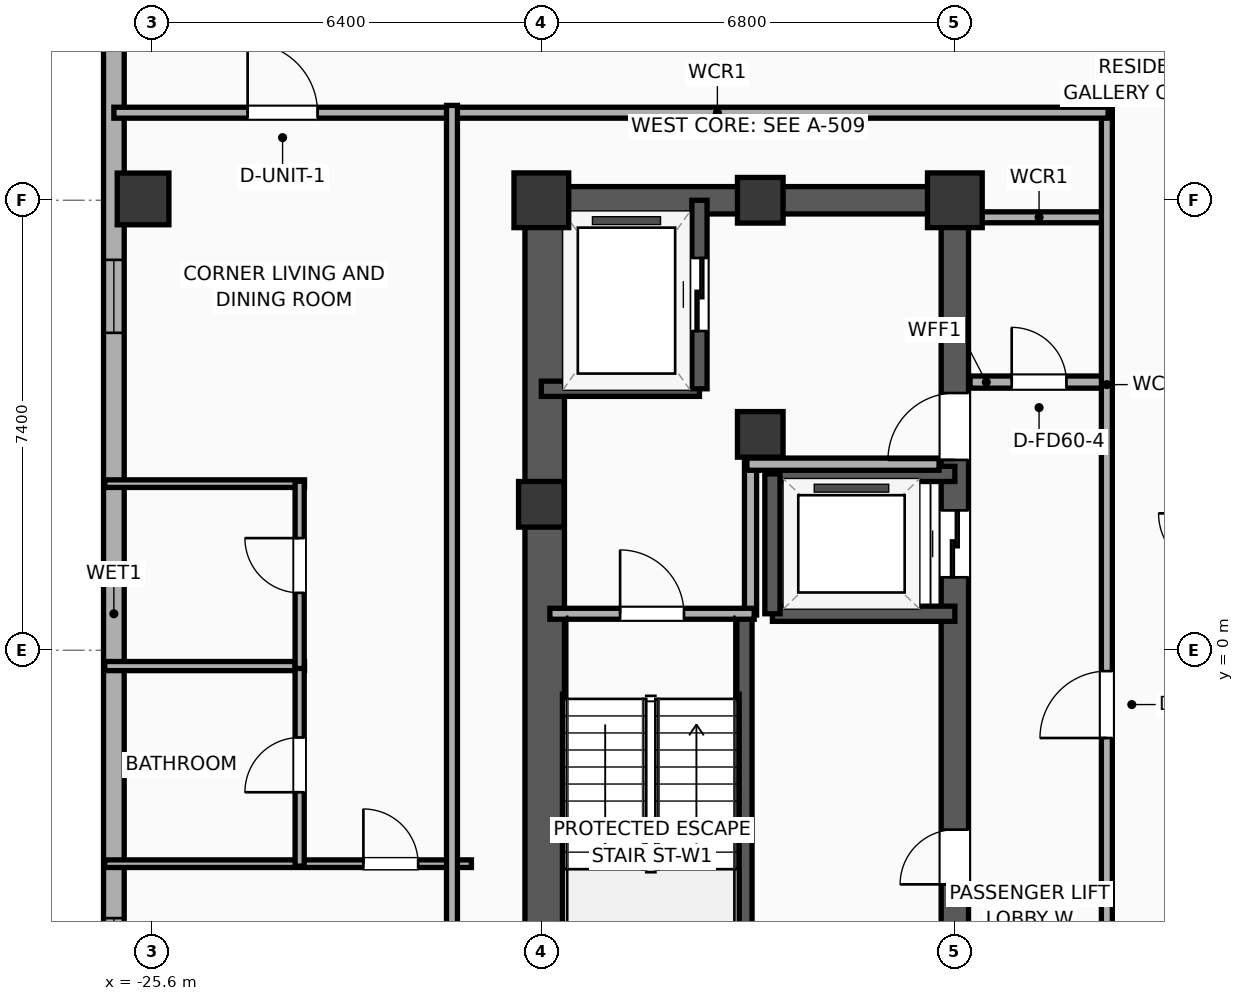
"""IFC4 building model, lengths in metres.
Left out: names, types, materials, properties, quantities, classifications, styles, units other than length and angle.
Written with IfcOpenShell. Run it as: python <this file> out.ifc"""

import sys

from ifc_helpers import new_model, si_unit, direction, frame, frame_2d, origin, origin_2d, place, context, subcontext, project, spatial, rectangle, hollow_rectangle, extrude, element, fill, save


model = new_model("IFC4")
c1 = context("Model", 3, precision=1e-05, world=origin(), true_north=direction((0.0, 1.0)))
c2 = subcontext(c1, "Body", "Model", "MODEL_VIEW")
j1 = project(units=[si_unit("LENGTHUNIT", "METRE"), si_unit("PLANEANGLEUNIT", "RADIAN")], contexts=[c1])
p1 = place(None, origin())
s1 = spatial("IfcSite", under=j1, at=p1, CompositionType="ELEMENT")
p2 = place(p1, origin())
s2 = spatial("IfcBuilding", under=s1, at=p2, CompositionType="ELEMENT")
p3 = place(p2, frame((0.0, 0.0, 227.5)))
s3 = spatial("IfcBuildingStorey", under=s2, at=p3, CompositionType="ELEMENT", Elevation=227.5)
p4 = place(p3, frame((-19.2, 2.4, 0.0), z_axis=(0.0, 0.0, 1.0), x_axis=(1.0, 0.0, 0.0)))
e1 = element("IfcColumn", 1, at=p4, inside=s3, PredefinedType="COLUMN", context=c2, shape_type="SweptSolid", body=[
    extrude(rectangle(XDim=0.75, YDim=0.75, at=origin_2d()), origin(), (0.0, 0.0, 1.0), 3.9),
])
p5 = place(p3, frame((-19.2, 7.4, 0.0), z_axis=(0.0, 0.0, 1.0), x_axis=(1.0, 0.0, 0.0)))
e2 = element("IfcColumn", 2, at=p5, inside=s3, PredefinedType="COLUMN", context=c2, shape_type="SweptSolid", body=[
    extrude(rectangle(XDim=0.9, YDim=0.9, at=origin_2d()), origin(), (0.0, 0.0, 1.0), 3.9),
])
for number, where, z_axis, x_axis in (
    (3, (-15.6, 7.4, 0.0), (0.0, 0.0, 1.0), (1.0, 0.0, 0.0)),
    (4, (-15.6, 3.55, 0.0), (0.0, 0.0, 1.0), (1.0, 0.0, 0.0)),
):
    element("IfcColumn", number, at=place(p3, frame(where, z_axis=z_axis, x_axis=x_axis)), inside=s3, PredefinedType="COLUMN", context=c2, shape_type="SweptSolid", body=[
        extrude(rectangle(XDim=0.75, YDim=0.75, at=origin_2d()), origin(), (0.0, 0.0, 1.0), 3.9),
    ])
p6 = place(p3, frame((-12.4, 7.4, 0.0), z_axis=(0.0, 0.0, 1.0), x_axis=(1.0, 0.0, 0.0)))
e5 = element("IfcColumn", 5, at=p6, inside=s3, PredefinedType="COLUMN", context=c2, shape_type="SweptSolid", body=[
    extrude(rectangle(XDim=0.9, YDim=0.9, at=origin_2d()), origin(), (0.0, 0.0, 1.0), 3.9),
])
p7 = place(p3, frame((-19.425, 7.4, 0.0), z_axis=(0.0, 0.0, 1.0), x_axis=(1.0, 0.0, 0.0)))
e6 = element("IfcWall", 6, at=p7, inside=s3, PredefinedType="SHEAR", context=c2, shape_type="SweptSolid", body=[
    extrude(rectangle(XDim=7.25, YDim=0.45, at=frame_2d((3.625, 0.0))), origin(), (0.0, 0.0, 1.0), 3.65),
])
p8 = place(p3, frame((-19.145, -7.4, 0.0), z_axis=(0.0, 0.0, 1.0), x_axis=(0.0, 1.0, 0.0)))
e7 = element("IfcWall", 7, at=p8, inside=s3, PredefinedType="SHEAR", context=c2, shape_type="SweptSolid", body=[
    extrude(rectangle(XDim=14.8, YDim=0.65, at=frame_2d((7.4, 0.0))), origin(), (0.0, 0.0, 1.0), 3.65),
])
p9 = place(p3, frame((-12.4, -7.4, 0.0), z_axis=(0.0, 0.0, 1.0), x_axis=(0.0, 1.0, 0.0)))
e8 = element("IfcWall", 8, at=p9, inside=s3, PredefinedType="SHEAR", context=c2, shape_type="SweptSolid", body=[
    extrude(rectangle(XDim=14.8, YDim=0.45, at=frame_2d((7.4, 0.0))), origin(), (0.0, 0.0, 1.0), 3.65),
])
p10 = place(p9, frame((8.6, 0.0, 0.0)))
e9 = element("IfcOpeningElement", 9, at=p10, cuts=e8, PredefinedType="OPENING", context=c2, shape_type="SweptSolid", body=[
    extrude(rectangle(XDim=1.1, YDim=2.05, at=frame_2d((0.55, 1.025))), frame((0.0, 0.235, 0.0), z_axis=(0.0, -1.0, 0.0), x_axis=(1.0, 0.0, 0.0)), (0.0, 0.0, 1.0), 0.47),
])
p11 = place(p9, frame((10.53, 0.0, 0.0)))
e10 = element("IfcOpeningElement", 10, at=p11, cuts=e8, PredefinedType="OPENING", context=c2, shape_type="SweptSolid", body=[
    extrude(rectangle(XDim=1.1, YDim=2.05, at=frame_2d((0.55, 1.025))), frame((0.0, 0.235, 0.0), z_axis=(0.0, -1.0, 0.0), x_axis=(1.0, 0.0, 0.0)), (0.0, 0.0, 1.0), 0.47),
])
p12 = place(p9, frame((3.55, 0.0, 0.0)))
e11 = element("IfcOpeningElement", 11, at=p12, cuts=e8, PredefinedType="OPENING", context=c2, shape_type="SweptSolid", body=[
    extrude(rectangle(XDim=0.9, YDim=2.05, at=frame_2d((0.45, 1.025))), frame((0.0, 0.235, 0.0), z_axis=(0.0, -1.0, 0.0), x_axis=(1.0, 0.0, 0.0)), (0.0, 0.0, 1.0), 0.47),
])
p13 = place(p3, frame((-15.86, -7.085, 0.0), z_axis=(0.0, 0.0, 1.0), x_axis=(0.0, 1.0, 0.0)))
e12 = element("IfcWall", 12, at=p13, inside=s3, PredefinedType="SOLIDWALL", context=c2, shape_type="SweptSolid", body=[
    extrude(rectangle(XDim=7.685, YDim=0.25, at=frame_2d((3.843, 0.0))), origin(), (0.0, 0.0, 1.0), 3.65),
])
p14 = place(p3, frame((-25.75, 7.422, 0.0), z_axis=(0.0, 0.0, 1.0), x_axis=(1.0, 0.0, 0.0)))
e13 = element("IfcColumn", 13, at=p14, inside=s3, PredefinedType="COLUMN", context=c2, shape_type="SweptSolid", body=[
    extrude(hollow_rectangle(XDim=0.85, YDim=0.85, WallThickness=0.028, at=origin_2d()), origin(), (0.0, 0.0, 1.0), 3.9),
])
p15 = place(p3, frame((-26.23, -15.383, 0.0), z_axis=(0.0, 0.0, 1.0), x_axis=(0.0, 1.0, 0.0)))
e14 = element("IfcWall", 14, at=p15, inside=s3, PredefinedType="ELEMENTEDWALL", context=c2, shape_type="SweptSolid", body=[
    extrude(rectangle(XDim=31.967, YDim=0.34, at=frame_2d((15.983, 0.0))), origin(), (0.0, 0.0, 1.0), 3.65),
])
p16 = place(p15, frame((29.431, 0.0, 0.75)))
e15 = element("IfcOpeningElement", 15, at=p16, cuts=e14, PredefinedType="OPENING", context=c2, shape_type="SweptSolid", body=[
    extrude(rectangle(XDim=1.2, YDim=2.05, at=frame_2d((0.6, 1.025))), frame((0.0, 0.18, 0.0), z_axis=(0.0, -1.0, 0.0), x_axis=(1.0, 0.0, 0.0)), (0.0, 0.0, 1.0), 0.36),
])
p17 = place(p15, frame((20.603, 0.0, 0.75)))
e16 = element("IfcOpeningElement", 16, at=p17, cuts=e14, PredefinedType="OPENING", context=c2, shape_type="SweptSolid", body=[
    extrude(rectangle(XDim=1.2, YDim=2.05, at=frame_2d((0.6, 1.025))), frame((0.0, 0.18, 0.0), z_axis=(0.0, -1.0, 0.0), x_axis=(1.0, 0.0, 0.0)), (0.0, 0.0, 1.0), 0.36),
])
p18 = place(p15, frame((9.778, 0.0, 0.75)))
e17 = element("IfcOpeningElement", 17, at=p18, cuts=e14, PredefinedType="OPENING", context=c2, shape_type="SweptSolid", body=[
    extrude(rectangle(XDim=1.2, YDim=2.05, at=frame_2d((0.6, 1.025))), frame((0.0, 0.18, 0.0), z_axis=(0.0, -1.0, 0.0), x_axis=(1.0, 0.0, 0.0)), (0.0, 0.0, 1.0), 0.36),
])
p19 = place(p3, frame((-19.2, 4.3, 0.0), z_axis=(0.0, 0.0, 1.0), x_axis=(1.0, 0.0, 0.0)))
e18 = element("IfcWall", 18, at=p19, inside=s3, PredefinedType="SOLIDWALL", context=c2, shape_type="SweptSolid", body=[
    extrude(rectangle(XDim=2.6, YDim=0.25, at=frame_2d((1.3, 0.0))), origin(), (0.0, 0.0, 1.0), 3.65),
])
p20 = place(p3, frame((-16.6, 4.3, 0.0), z_axis=(0.0, 0.0, 1.0), x_axis=(0.0, 1.0, 0.0)))
e19 = element("IfcWall", 19, at=p20, inside=s3, PredefinedType="SOLIDWALL", context=c2, shape_type="SweptSolid", body=[
    extrude(rectangle(XDim=3.1, YDim=0.25, at=frame_2d((1.55, 0.0))), origin(), (0.0, 0.0, 1.0), 3.65),
])
p21 = place(p20, frame((0.95, 0.0, 0.0)))
e20 = element("IfcOpeningElement", 20, at=p21, cuts=e19, PredefinedType="OPENING", context=c2, shape_type="SweptSolid", body=[
    extrude(rectangle(XDim=1.2, YDim=2.05, at=frame_2d((0.6, 1.025))), frame((0.0, 0.135, 0.0), z_axis=(0.0, -1.0, 0.0), x_axis=(1.0, 0.0, 0.0)), (0.0, 0.0, 1.0), 0.27),
])
for number, where, z_axis, x_axis in (
    (21, (-15.4, 0.6, 0.0), (0.0, 0.0, 1.0), (1.0, 0.0, 0.0)),
    (22, (-12.4, 2.9, 0.0), (0.0, 0.0, 1.0), (-1.0, 0.0, 0.0)),
):
    element("IfcWall", number, at=place(p3, frame(where, z_axis=z_axis, x_axis=x_axis)), inside=s3, PredefinedType="SOLIDWALL", context=c2, shape_type="SweptSolid", body=[
        extrude(rectangle(XDim=3.0, YDim=0.25, at=frame_2d((1.5, 0.0))), origin(), (0.0, 0.0, 1.0), 3.65),
    ])
p22 = place(p3, frame((-15.4, 2.9, 0.0), z_axis=(0.0, 0.0, 1.0), x_axis=(0.0, -1.0, 0.0)))
e23 = element("IfcWall", 23, at=p22, inside=s3, PredefinedType="SOLIDWALL", context=c2, shape_type="SweptSolid", body=[
    extrude(rectangle(XDim=2.3, YDim=0.25, at=frame_2d((1.15, 0.0))), origin(), (0.0, 0.0, 1.0), 3.65),
])
p23 = place(p3, frame((-15.76, 0.58, 0.0), z_axis=(0.0, 0.0, 1.0), x_axis=(0.0, 1.0, 0.0)))
e24 = element("IfcWall", 24, at=p23, inside=s3, PredefinedType="PARTITIONING", context=c2, shape_type="SweptSolid", body=[
    extrude(rectangle(XDim=2.52, YDim=0.2, at=frame_2d((1.26, 0.0))), origin(), (0.0, 0.0, 1.0), 3.65),
])
p24 = place(p3, frame((-15.82, 3.06, 0.0), z_axis=(0.0, 0.0, 1.0), x_axis=(1.0, 0.0, 0.0)))
e25 = element("IfcWall", 25, at=p24, inside=s3, PredefinedType="PARTITIONING", context=c2, shape_type="SweptSolid", body=[
    extrude(rectangle(XDim=3.16, YDim=0.2, at=frame_2d((1.58, 0.0))), origin(), (0.0, 0.0, 1.0), 3.65),
])
p25 = place(p3, frame((-19.06, 0.6, 0.0), z_axis=(0.0, 0.0, 1.0), x_axis=(1.0, 0.0, 0.0)))
e26 = element("IfcWall", 26, at=p25, inside=s3, PredefinedType="PARTITIONING", context=c2, shape_type="SweptSolid", body=[
    extrude(rectangle(XDim=3.36, YDim=0.18, at=frame_2d((1.68, 0.0))), origin(), (0.0, 0.0, 1.0), 3.65),
])
p26 = place(p25, frame((1.155, 0.0, 0.0)))
e27 = element("IfcOpeningElement", 27, at=p26, cuts=e26, PredefinedType="OPENING", context=c2, shape_type="SweptSolid", body=[
    extrude(rectangle(XDim=1.05, YDim=2.05, at=frame_2d((0.525, 1.025))), frame((0.0, 0.1, 0.0), z_axis=(0.0, -1.0, 0.0), x_axis=(1.0, 0.0, 0.0)), (0.0, 0.0, 1.0), 0.2),
])
p27 = place(p3, frame((-12.15, 4.41, 0.0), z_axis=(0.0, 0.0, 1.0), x_axis=(1.0, 0.0, 0.0)))
e28 = element("IfcWall", 28, at=p27, inside=s3, PredefinedType="PARTITIONING", context=c2, shape_type="SweptSolid", body=[
    extrude(rectangle(XDim=2.27, YDim=0.2, at=frame_2d((1.135, 0.0))), origin(), (0.0, 0.0, 1.0), 3.65),
])
p28 = place(p27, frame((0.685, 0.0, 0.0)))
e29 = element("IfcOpeningElement", 29, at=p28, cuts=e28, PredefinedType="OPENING", context=c2, shape_type="SweptSolid", body=[
    extrude(rectangle(XDim=0.9, YDim=2.05, at=frame_2d((0.45, 1.025))), frame((0.0, 0.11, 0.0), z_axis=(0.0, -1.0, 0.0), x_axis=(1.0, 0.0, 0.0)), (0.0, 0.0, 1.0), 0.22),
])
p29 = place(p3, frame((-12.15, 7.12, 0.0), z_axis=(0.0, 0.0, 1.0), x_axis=(1.0, 0.0, 0.0)))
e30 = element("IfcWall", 30, at=p29, inside=s3, PredefinedType="PARTITIONING", context=c2, shape_type="SweptSolid", body=[
    extrude(rectangle(XDim=2.27, YDim=0.18, at=frame_2d((1.135, 0.0))), origin(), (0.0, 0.0, 1.0), 3.65),
])
p30 = place(p3, frame((-9.9, -8.93, 0.0), z_axis=(0.0, 0.0, 1.0), x_axis=(0.0, 1.0, 0.0)))
e31 = element("IfcWall", 31, at=p30, inside=s3, PredefinedType="PARTITIONING", context=c2, shape_type="SweptSolid", body=[
    extrude(rectangle(XDim=17.86, YDim=0.18, at=frame_2d((8.93, 0.0))), origin(), (0.0, 0.0, 1.0), 3.65),
])
p31 = place(p30, frame((7.487, 0.0, 0.0)))
e32 = element("IfcOpeningElement", 32, at=p31, cuts=e31, PredefinedType="OPENING", context=c2, shape_type="SweptSolid", body=[
    extrude(rectangle(XDim=1.1, YDim=2.05, at=frame_2d((0.55, 1.025))), frame((0.0, 0.1, 0.0), z_axis=(0.0, -1.0, 0.0), x_axis=(1.0, 0.0, 0.0)), (0.0, 0.0, 1.0), 0.2),
])
p32 = place(p3, frame((-26.23, 8.84, 0.0), z_axis=(0.0, 0.0, 1.0), x_axis=(1.0, 0.0, 0.0)))
e33 = element("IfcWall", 33, at=p32, inside=s3, PredefinedType="PARTITIONING", context=c2, shape_type="SweptSolid", body=[
    extrude(rectangle(XDim=16.35, YDim=0.18, at=frame_2d((8.175, 0.0))), origin(), (0.0, 0.0, 1.0), 3.65),
])
p33 = place(p32, frame((2.2, 0.0, 0.0)))
e34 = element("IfcOpeningElement", 34, at=p33, cuts=e33, PredefinedType="OPENING", context=c2, shape_type="SweptSolid", body=[
    extrude(rectangle(XDim=1.15, YDim=2.05, at=frame_2d((0.575, 1.025))), frame((0.0, 0.1, 0.0), z_axis=(0.0, -1.0, 0.0), x_axis=(1.0, 0.0, 0.0)), (0.0, 0.0, 1.0), 0.2),
])
p34 = place(p3, frame((-26.38, 2.74, 0.0), z_axis=(0.0, 0.0, 1.0), x_axis=(1.0, 0.0, 0.0)))
e35 = element("IfcWall", 35, at=p34, inside=s3, PredefinedType="PARTITIONING", context=c2, shape_type="SweptSolid", body=[
    extrude(rectangle(XDim=3.285, YDim=0.125, at=frame_2d((1.643, 0.0))), origin(), (0.0, 0.0, 1.0), 3.65),
])
p35 = place(p3, frame((-26.38, -0.26, 0.0), z_axis=(0.0, 0.0, 1.0), x_axis=(1.0, 0.0, 0.0)))
e36 = element("IfcWall", 36, at=p35, inside=s3, PredefinedType="PLUMBINGWALL", context=c2, shape_type="SweptSolid", body=[
    extrude(rectangle(XDim=3.285, YDim=0.15, at=frame_2d((1.643, 0.0))), origin(), (0.0, 0.0, 1.0), 3.65),
])
p36 = place(p3, frame((-26.38, -3.51, 0.0), z_axis=(0.0, 0.0, 1.0), x_axis=(1.0, 0.0, 0.0)))
e37 = element("IfcWall", 37, at=p36, inside=s3, PredefinedType="PARTITIONING", context=c2, shape_type="SweptSolid", body=[
    extrude(rectangle(XDim=6.03, YDim=0.125, at=frame_2d((3.015, 0.0))), origin(), (0.0, 0.0, 1.0), 3.65),
])
p37 = place(p36, frame((4.253, 0.0, 0.0)))
e38 = element("IfcOpeningElement", 38, at=p37, cuts=e37, PredefinedType="OPENING", context=c2, shape_type="SweptSolid", body=[
    extrude(rectangle(XDim=0.9, YDim=2.05, at=frame_2d((0.45, 1.025))), frame((0.0, 0.073, 0.0), z_axis=(0.0, -1.0, 0.0), x_axis=(1.0, 0.0, 0.0)), (0.0, 0.0, 1.0), 0.145),
])
p38 = place(p3, frame((-23.175, -3.55, 0.0), z_axis=(0.0, 0.0, 1.0), x_axis=(0.0, 1.0, 0.0)))
e39 = element("IfcWall", 39, at=p38, inside=s3, PredefinedType="PLUMBINGWALL", context=c2, shape_type="SweptSolid", body=[
    extrude(rectangle(XDim=3.33, YDim=0.15, at=frame_2d((1.665, 0.0))), origin(), (0.0, 0.0, 1.0), 3.65),
])
p39 = place(p38, frame((1.215, 0.0, 0.0)))
e40 = element("IfcOpeningElement", 40, at=p39, cuts=e39, PredefinedType="OPENING", context=c2, shape_type="SweptSolid", body=[
    extrude(rectangle(XDim=0.9, YDim=2.05, at=frame_2d((0.45, 1.025))), frame((0.0, 0.085, 0.0), z_axis=(0.0, -1.0, 0.0), x_axis=(1.0, 0.0, 0.0)), (0.0, 0.0, 1.0), 0.17),
])
p40 = place(p3, frame((-23.175, -0.3, 0.0), z_axis=(0.0, 0.0, 1.0), x_axis=(0.0, 1.0, 0.0)))
e41 = element("IfcWall", 41, at=p40, inside=s3, PredefinedType="PLUMBINGWALL", context=c2, shape_type="SweptSolid", body=[
    extrude(rectangle(XDim=3.08, YDim=0.15, at=frame_2d((1.54, 0.0))), origin(), (0.0, 0.0, 1.0), 3.65),
])
p41 = place(p40, frame((1.244, 0.0, 0.0)))
e42 = element("IfcOpeningElement", 42, at=p41, cuts=e41, PredefinedType="OPENING", context=c2, shape_type="SweptSolid", body=[
    extrude(rectangle(XDim=0.9, YDim=2.05, at=frame_2d((0.45, 1.025))), frame((0.0, 0.085, 0.0), z_axis=(0.0, -1.0, 0.0), x_axis=(1.0, 0.0, 0.0)), (0.0, 0.0, 1.0), 0.17),
])
p42 = place(p3, frame((-20.67, -8.96, 0.0), z_axis=(0.0, 0.0, 1.0), x_axis=(0.0, 1.0, 0.0)))
e43 = element("IfcWall", 43, at=p42, inside=s3, PredefinedType="PARTITIONING", context=c2, shape_type="SweptSolid", body=[
    extrude(rectangle(XDim=17.92, YDim=0.18, at=frame_2d((8.96, 0.0))), origin(), (0.0, 0.0, 1.0), 3.65),
])
p43 = place(p17, origin())
e44 = element("IfcWindow", 44, at=p43, inside=s3, PartitioningType="SINGLE_PANEL", PredefinedType="WINDOW", context=c2, shape_type="SweptSolid", body=[
    extrude(rectangle(XDim=1.2, YDim=2.05, at=frame_2d((0.6, 1.025))), frame((0.0, 0.03, 0.0), z_axis=(0.0, -1.0, 0.0), x_axis=(1.0, 0.0, 0.0)), (0.0, 0.0, 1.0), 0.06),
])
fill(e16, e44)
p44 = place(p18, origin())
e45 = element("IfcWindow", 45, at=p44, inside=s3, PartitioningType="SINGLE_PANEL", PredefinedType="WINDOW", context=c2, shape_type="SweptSolid", body=[
    extrude(rectangle(XDim=1.2, YDim=2.05, at=frame_2d((0.6, 1.025))), frame((0.0, 0.03, 0.0), z_axis=(0.0, -1.0, 0.0), x_axis=(1.0, 0.0, 0.0)), (0.0, 0.0, 1.0), 0.06),
])
fill(e17, e45)
p45 = place(p21, origin())
e46 = element("IfcDoor", 46, at=p45, inside=s3, OperationType="SLIDING_TO_LEFT", PredefinedType="DOOR", context=c2, shape_type="SweptSolid", body=[
    extrude(rectangle(XDim=1.2, YDim=2.05, at=frame_2d((0.6, 1.025))), frame((0.0, 0.025, 0.0), z_axis=(0.0, -1.0, 0.0), x_axis=(1.0, 0.0, 0.0)), (0.0, 0.0, 1.0), 0.05),
])
fill(e20, e46)
p46 = place(p10, origin())
e47 = element("IfcDoor", 47, at=p46, inside=s3, OperationType="SLIDING_TO_LEFT", PredefinedType="DOOR", context=c2, shape_type="SweptSolid", body=[
    extrude(rectangle(XDim=1.1, YDim=2.05, at=frame_2d((0.55, 1.025))), frame((0.0, 0.025, 0.0), z_axis=(0.0, -1.0, 0.0), x_axis=(1.0, 0.0, 0.0)), (0.0, 0.0, 1.0), 0.05),
])
fill(e9, e47)
p47 = place(p26, origin())
e48 = element("IfcDoor", 48, at=p47, inside=s3, OperationType="SINGLE_SWING_LEFT", PredefinedType="DOOR", context=c2, shape_type="SweptSolid", body=[
    extrude(rectangle(XDim=1.05, YDim=2.05, at=frame_2d((0.525, 1.025))), frame((0.0, 0.025, 0.0), z_axis=(0.0, -1.0, 0.0), x_axis=(1.0, 0.0, 0.0)), (0.0, 0.0, 1.0), 0.05),
])
fill(e27, e48)
p48 = place(p28, origin())
e49 = element("IfcDoor", 49, at=p48, inside=s3, OperationType="SINGLE_SWING_LEFT", PredefinedType="DOOR", context=c2, shape_type="SweptSolid", body=[
    extrude(rectangle(XDim=0.9, YDim=2.05, at=frame_2d((0.45, 1.025))), frame((0.0, 0.025, 0.0), z_axis=(0.0, -1.0, 0.0), x_axis=(1.0, 0.0, 0.0)), (0.0, 0.0, 1.0), 0.05),
])
fill(e29, e49)
p49 = place(p31, origin())
e50 = element("IfcDoor", 50, at=p49, inside=s3, OperationType="SINGLE_SWING_LEFT", PredefinedType="DOOR", context=c2, shape_type="SweptSolid", body=[
    extrude(rectangle(XDim=1.1, YDim=2.05, at=frame_2d((0.55, 1.025))), frame((0.0, 0.025, 0.0), z_axis=(0.0, -1.0, 0.0), x_axis=(1.0, 0.0, 0.0)), (0.0, 0.0, 1.0), 0.05),
])
fill(e32, e50)
p50 = place(p33, origin())
e51 = element("IfcDoor", 51, at=p50, inside=s3, OperationType="SINGLE_SWING_LEFT", PredefinedType="DOOR", context=c2, shape_type="SweptSolid", body=[
    extrude(rectangle(XDim=1.15, YDim=2.05, at=frame_2d((0.575, 1.025))), frame((0.0, 0.025, 0.0), z_axis=(0.0, -1.0, 0.0), x_axis=(1.0, 0.0, 0.0)), (0.0, 0.0, 1.0), 0.05),
])
fill(e34, e51)
p51 = place(p37, origin())
e52 = element("IfcDoor", 52, at=p51, inside=s3, OperationType="SINGLE_SWING_LEFT", PredefinedType="DOOR", context=c2, shape_type="SweptSolid", body=[
    extrude(rectangle(XDim=0.9, YDim=2.05, at=frame_2d((0.45, 1.025))), frame((0.0, 0.025, 0.0), z_axis=(0.0, -1.0, 0.0), x_axis=(1.0, 0.0, 0.0)), (0.0, 0.0, 1.0), 0.05),
])
fill(e38, e52)
p52 = place(p39, origin())
e53 = element("IfcDoor", 53, at=p52, inside=s3, OperationType="SINGLE_SWING_LEFT", PredefinedType="DOOR", context=c2, shape_type="SweptSolid", body=[
    extrude(rectangle(XDim=0.9, YDim=2.05, at=frame_2d((0.45, 1.025))), frame((0.0, 0.025, 0.0), z_axis=(0.0, -1.0, 0.0), x_axis=(1.0, 0.0, 0.0)), (0.0, 0.0, 1.0), 0.05),
])
fill(e40, e53)
p53 = place(p41, origin())
e54 = element("IfcDoor", 54, at=p53, inside=s3, OperationType="SINGLE_SWING_RIGHT", PredefinedType="DOOR", context=c2, shape_type="SweptSolid", body=[
    extrude(rectangle(XDim=0.9, YDim=2.05, at=frame_2d((0.45, 1.025))), frame((0.0, 0.025, 0.0), z_axis=(0.0, -1.0, 0.0), x_axis=(1.0, 0.0, 0.0)), (0.0, 0.0, 1.0), 0.05),
])
fill(e42, e54)
p54 = place(p11, origin())
e55 = element("IfcDoor", 55, at=p54, inside=s3, OperationType="SINGLE_SWING_LEFT", PredefinedType="DOOR", context=c2, shape_type="SweptSolid", body=[
    extrude(rectangle(XDim=1.1, YDim=2.05, at=frame_2d((0.55, 1.025))), frame((0.0, 0.025, 0.0), z_axis=(0.0, -1.0, 0.0), x_axis=(1.0, 0.0, 0.0)), (0.0, 0.0, 1.0), 0.05),
])
fill(e10, e55)
p55 = place(p12, origin())
e56 = element("IfcDoor", 56, at=p55, inside=s3, OperationType="SINGLE_SWING_LEFT", PredefinedType="DOOR", context=c2, shape_type="SweptSolid", body=[
    extrude(rectangle(XDim=0.9, YDim=2.05, at=frame_2d((0.45, 1.025))), frame((0.0, 0.025, 0.0), z_axis=(0.0, -1.0, 0.0), x_axis=(1.0, 0.0, 0.0)), (0.0, 0.0, 1.0), 0.05),
])
fill(e11, e56)
save(model, sys.argv[1])
